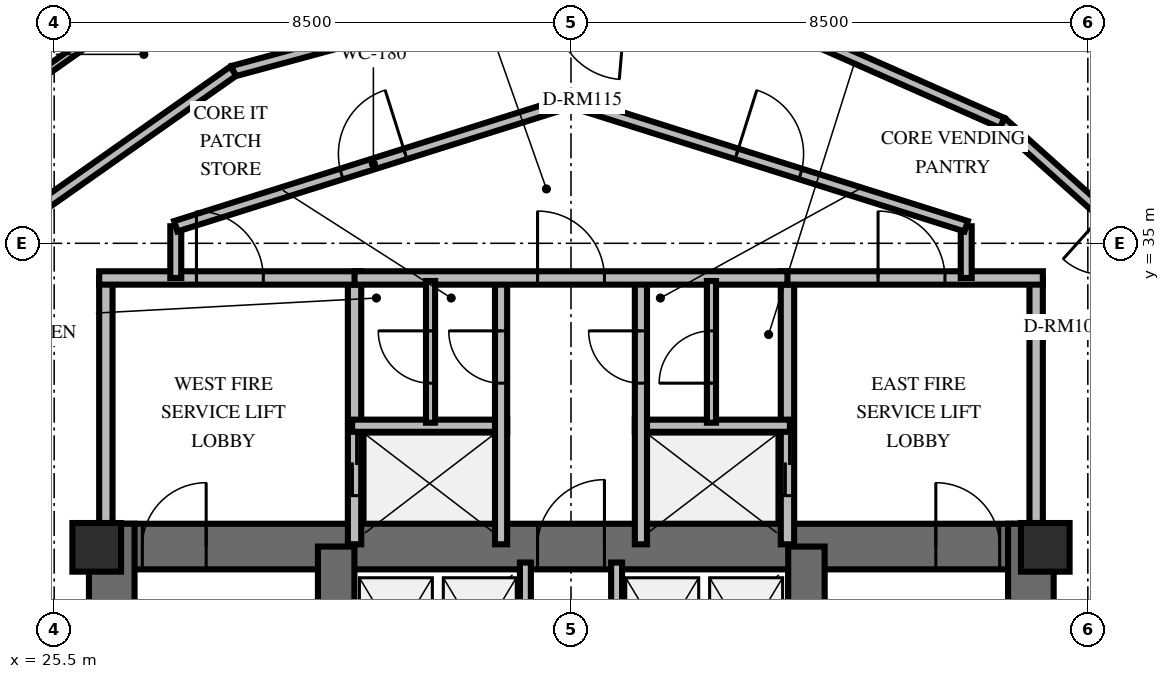
"""IFC4 building model, lengths in metres.
Left out: names, types, materials, properties, quantities, classifications, styles, units other than length and angle.
Written with IfcOpenShell. Run it as: python <this file> out.ifc"""

import sys

from ifc_helpers import new_model, si_unit, direction, frame, frame_2d, origin, origin_2d, place, context, subcontext, project, spatial, rectangle, extrude, element, fill, save


model = new_model("IFC4")
c1 = context("Model", 3, precision=1e-05, world=origin(), true_north=direction((0.0, 1.0)))
c2 = subcontext(c1, "Body", "Model", "MODEL_VIEW")
j1 = project(units=[si_unit("LENGTHUNIT", "METRE"), si_unit("PLANEANGLEUNIT", "RADIAN")], contexts=[c1])
p1 = place(None, origin())
s1 = spatial("IfcSite", under=j1, at=p1, CompositionType="ELEMENT")
p2 = place(p1, origin())
s2 = spatial("IfcBuilding", under=s1, at=p2, CompositionType="ELEMENT")
p3 = place(p2, frame((0.0, 0.0, 180.8)))
s3 = spatial("IfcBuildingStorey", under=s2, at=p3, CompositionType="ELEMENT", Elevation=180.8)
p4 = place(p3, frame((26.072, 30.013, 0.0), z_axis=(0.0, 0.0, 1.0), x_axis=(1.0, 0.0, 0.0)))
e1 = element("IfcWall", 1, at=p4, inside=s3, PredefinedType="SHEAR", context=c2, shape_type="SweptSolid", body=[
    extrude(rectangle(XDim=15.866, YDim=0.75, at=frame_2d((7.933, 0.0))), origin(), (0.0, 0.0, 1.0), 3.6),
])
p5 = place(p4, frame((0.878, 0.0, 0.0)))
e2 = element("IfcOpeningElement", 2, at=p5, cuts=e1, PredefinedType="OPENING", context=c2, shape_type="SweptSolid", body=[
    extrude(rectangle(XDim=1.05, YDim=2.15, at=frame_2d((0.525, 1.075))), frame((0.0, 0.385, 0.0), z_axis=(0.0, -1.0, 0.0), x_axis=(1.0, 0.0, 0.0)), (0.0, 0.0, 1.0), 0.77),
])
p6 = place(p4, frame((13.928, 0.0, 0.0)))
e3 = element("IfcOpeningElement", 3, at=p6, cuts=e1, PredefinedType="OPENING", context=c2, shape_type="SweptSolid", body=[
    extrude(rectangle(XDim=1.05, YDim=2.15, at=frame_2d((0.525, 1.075))), frame((0.0, 0.385, 0.0), z_axis=(0.0, -1.0, 0.0), x_axis=(1.0, 0.0, 0.0)), (0.0, 0.0, 1.0), 0.77),
])
p7 = place(p4, frame((7.378, 0.0, 0.0)))
e4 = element("IfcOpeningElement", 4, at=p7, cuts=e1, PredefinedType="OPENING", context=c2, shape_type="SweptSolid", body=[
    extrude(rectangle(XDim=1.1, YDim=2.15, at=frame_2d((0.55, 1.075))), frame((0.0, 0.385, 0.0), z_axis=(0.0, -1.0, 0.0), x_axis=(1.0, 0.0, 0.0)), (0.0, 0.0, 1.0), 0.77),
])
for number, where, z_axis, x_axis in (
    (5, (26.447, 19.812, 0.0), (0.0, 0.0, 1.0), (0.0, 1.0, 0.0)),
    (6, (41.563, 19.812, 0.0), (0.0, 0.0, 1.0), (0.0, 1.0, 0.0)),
):
    element("IfcWall", number, at=place(p3, frame(where, z_axis=z_axis, x_axis=x_axis)), inside=s3, PredefinedType="SHEAR", context=c2, shape_type="SweptSolid", body=[
        extrude(rectangle(XDim=10.576, YDim=0.75, at=frame_2d((5.288, 0.0))), origin(), (0.0, 0.0, 1.0), 3.6),
    ])
for number, where, z_axis, x_axis in (
    (7, (30.138, 20.187, 0.0), (0.0, 0.0, 1.0), (0.0, 1.0, 0.0)),
    (8, (37.872, 20.187, 0.0), (0.0, 0.0, 1.0), (0.0, 1.0, 0.0)),
):
    element("IfcWall", number, at=place(p3, frame(where, z_axis=z_axis, x_axis=x_axis)), inside=s3, PredefinedType="SHEAR", context=c2, shape_type="SweptSolid", body=[
        extrude(rectangle(XDim=9.826, YDim=0.6, at=frame_2d((4.913, 0.0))), origin(), (0.0, 0.0, 1.0), 3.6),
    ])
for number, where, z_axis, x_axis in (
    (9, (26.2, 30.0, 0.0), (0.0, 0.0, 1.0), (1.0, 0.0, 0.0)),
    (10, (41.8, 30.0, 0.0), (0.0, 0.0, 1.0), (1.0, 0.0, 0.0)),
):
    element("IfcColumn", number, at=place(p3, frame(where, z_axis=z_axis, x_axis=x_axis)), inside=s3, PredefinedType="PILASTER", context=c2, shape_type="SweptSolid", body=[
        extrude(rectangle(XDim=0.8, YDim=0.8, at=origin_2d()), origin(), (0.0, 0.0, 1.0), 3.6),
    ])
p8 = place(p3, frame((27.174, 42.753, 0.0), z_axis=(0.0, 0.0, 1.0), x_axis=(-0.817646670358, -0.575720350911, 0.0)))
e11 = element("IfcWall", 11, at=p8, inside=s3, PredefinedType="SOLIDWALL", context=c2, shape_type="SweptSolid", body=[
    extrude(rectangle(XDim=8.127, YDim=0.3, at=frame_2d((4.063, 0.0))), origin(), (0.0, 0.0, 1.0), 2.66),
])
p9 = place(p8, frame((0.35, 0.0, 0.0)))
e12 = element("IfcOpeningElement", 12, at=p9, cuts=e11, PredefinedType="OPENING", context=c2, shape_type="SweptSolid", body=[
    extrude(rectangle(XDim=1.05, YDim=2.15, at=frame_2d((0.525, 1.075))), frame((0.0, 0.16, 0.0), z_axis=(0.0, -1.0, 0.0), x_axis=(1.0, 0.0, 0.0)), (0.0, 0.0, 1.0), 0.32),
])
p10 = place(p3, frame((26.35, 30.05, 0.0), z_axis=(0.0, 0.0, 1.0), x_axis=(0.0, 1.0, 0.0)))
e13 = element("IfcWall", 13, at=p10, inside=s3, PredefinedType="SOLIDWALL", context=c2, shape_type="SweptSolid", body=[
    extrude(rectangle(XDim=4.38, YDim=0.22, at=frame_2d((2.19, 0.0))), origin(), (0.0, 0.0, 1.0), 2.46),
])
p11 = place(p3, frame((30.44, 30.05, 0.0), z_axis=(0.0, 0.0, 1.0), x_axis=(0.0, 1.0, 0.0)))
e14 = element("IfcWall", 14, at=p11, inside=s3, PredefinedType="SOLIDWALL", context=c2, shape_type="SweptSolid", body=[
    extrude(rectangle(XDim=4.38, YDim=0.22, at=frame_2d((2.19, 0.0))), origin(), (0.0, 0.0, 1.0), 2.46),
])
p12 = place(p11, frame((0.8, 0.0, 0.0)))
e15 = element("IfcOpeningElement", 15, at=p12, cuts=e14, PredefinedType="OPENING", context=c2, shape_type="SweptSolid", body=[
    extrude(rectangle(XDim=1.05, YDim=2.1, at=frame_2d((0.525, 1.05))), frame((0.0, 0.12, 0.0), z_axis=(0.0, -1.0, 0.0), x_axis=(1.0, 0.0, 0.0)), (0.0, 0.0, 1.0), 0.24),
])
p13 = place(p3, frame((26.24, 34.43, 0.0), z_axis=(0.0, 0.0, 1.0), x_axis=(1.0, 0.0, 0.0)))
e16 = element("IfcWall", 16, at=p13, inside=s3, PredefinedType="SOLIDWALL", context=c2, shape_type="SweptSolid", body=[
    extrude(rectangle(XDim=4.31, YDim=0.22, at=frame_2d((2.155, 0.0))), origin(), (0.0, 0.0, 1.0), 2.46),
])
p14 = place(p13, frame((1.6, 0.0, 0.0)))
e17 = element("IfcOpeningElement", 17, at=p14, cuts=e16, PredefinedType="OPENING", context=c2, shape_type="SweptSolid", body=[
    extrude(rectangle(XDim=1.1, YDim=2.15, at=frame_2d((0.55, 1.075))), frame((0.0, 0.12, 0.0), z_axis=(0.0, -1.0, 0.0), x_axis=(1.0, 0.0, 0.0)), (0.0, 0.0, 1.0), 0.24),
])
p15 = place(p3, frame((30.4, 32.0, 0.0), z_axis=(0.0, 0.0, 1.0), x_axis=(1.0, 0.0, 0.0)))
e18 = element("IfcWall", 18, at=p15, inside=s3, PredefinedType="SOLIDWALL", context=c2, shape_type="SweptSolid", body=[
    extrude(rectangle(XDim=2.55, YDim=0.2, at=frame_2d((1.275, 0.0))), origin(), (0.0, 0.0, 1.0), 2.46),
])
p16 = place(p3, frame((32.85, 30.05, 0.0), z_axis=(0.0, 0.0, 1.0), x_axis=(0.0, 1.0, 0.0)))
e19 = element("IfcWall", 19, at=p16, inside=s3, PredefinedType="SOLIDWALL", context=c2, shape_type="SweptSolid", body=[
    extrude(rectangle(XDim=4.38, YDim=0.2, at=frame_2d((2.19, 0.0))), origin(), (0.0, 0.0, 1.0), 2.46),
])
p17 = place(p16, frame((2.65, 0.0, 0.0)))
e20 = element("IfcOpeningElement", 20, at=p17, cuts=e19, PredefinedType="OPENING", context=c2, shape_type="SweptSolid", body=[
    extrude(rectangle(XDim=0.86, YDim=2.05, at=frame_2d((0.43, 1.025))), frame((0.0, 0.11, 0.0), z_axis=(0.0, -1.0, 0.0), x_axis=(1.0, 0.0, 0.0)), (0.0, 0.0, 1.0), 0.22),
])
p18 = place(p3, frame((37.56, 30.05, 0.0), z_axis=(0.0, 0.0, 1.0), x_axis=(0.0, 1.0, 0.0)))
e21 = element("IfcWall", 21, at=p18, inside=s3, PredefinedType="SOLIDWALL", context=c2, shape_type="SweptSolid", body=[
    extrude(rectangle(XDim=4.38, YDim=0.22, at=frame_2d((2.19, 0.0))), origin(), (0.0, 0.0, 1.0), 2.46),
])
p19 = place(p18, frame((0.8, 0.0, 0.0)))
e22 = element("IfcOpeningElement", 22, at=p19, cuts=e21, PredefinedType="OPENING", context=c2, shape_type="SweptSolid", body=[
    extrude(rectangle(XDim=1.05, YDim=2.1, at=frame_2d((0.525, 1.05))), frame((0.0, 0.12, 0.0), z_axis=(0.0, -1.0, 0.0), x_axis=(1.0, 0.0, 0.0)), (0.0, 0.0, 1.0), 0.24),
])
p20 = place(p3, frame((41.65, 30.05, 0.0), z_axis=(0.0, 0.0, 1.0), x_axis=(0.0, 1.0, 0.0)))
e23 = element("IfcWall", 23, at=p20, inside=s3, PredefinedType="SOLIDWALL", context=c2, shape_type="SweptSolid", body=[
    extrude(rectangle(XDim=4.38, YDim=0.22, at=frame_2d((2.19, 0.0))), origin(), (0.0, 0.0, 1.0), 2.46),
])
p21 = place(p3, frame((37.45, 34.43, 0.0), z_axis=(0.0, 0.0, 1.0), x_axis=(1.0, 0.0, 0.0)))
e24 = element("IfcWall", 24, at=p21, inside=s3, PredefinedType="SOLIDWALL", context=c2, shape_type="SweptSolid", body=[
    extrude(rectangle(XDim=4.31, YDim=0.22, at=frame_2d((2.155, 0.0))), origin(), (0.0, 0.0, 1.0), 2.46),
])
p22 = place(p21, frame((1.6, 0.0, 0.0)))
e25 = element("IfcOpeningElement", 25, at=p22, cuts=e24, PredefinedType="OPENING", context=c2, shape_type="SweptSolid", body=[
    extrude(rectangle(XDim=1.1, YDim=2.15, at=frame_2d((0.55, 1.075))), frame((0.0, 0.12, 0.0), z_axis=(0.0, -1.0, 0.0), x_axis=(1.0, 0.0, 0.0)), (0.0, 0.0, 1.0), 0.24),
])
p23 = place(p3, frame((35.05, 32.0, 0.0), z_axis=(0.0, 0.0, 1.0), x_axis=(1.0, 0.0, 0.0)))
e26 = element("IfcWall", 26, at=p23, inside=s3, PredefinedType="SOLIDWALL", context=c2, shape_type="SweptSolid", body=[
    extrude(rectangle(XDim=2.55, YDim=0.2, at=frame_2d((1.275, 0.0))), origin(), (0.0, 0.0, 1.0), 2.46),
])
p24 = place(p3, frame((35.15, 30.05, 0.0), z_axis=(0.0, 0.0, 1.0), x_axis=(0.0, 1.0, 0.0)))
e27 = element("IfcWall", 27, at=p24, inside=s3, PredefinedType="SOLIDWALL", context=c2, shape_type="SweptSolid", body=[
    extrude(rectangle(XDim=4.38, YDim=0.2, at=frame_2d((2.19, 0.0))), origin(), (0.0, 0.0, 1.0), 2.46),
])
p25 = place(p24, frame((2.65, 0.0, 0.0)))
e28 = element("IfcOpeningElement", 28, at=p25, cuts=e27, PredefinedType="OPENING", context=c2, shape_type="SweptSolid", body=[
    extrude(rectangle(XDim=0.86, YDim=2.05, at=frame_2d((0.43, 1.025))), frame((0.0, 0.11, 0.0), z_axis=(0.0, -1.0, 0.0), x_axis=(1.0, 0.0, 0.0)), (0.0, 0.0, 1.0), 0.22),
])
p26 = place(p3, frame((30.44, 34.43, 0.0), z_axis=(0.0, 0.0, 1.0), x_axis=(1.0, 0.0, 0.0)))
e29 = element("IfcWall", 29, at=p26, inside=s3, PredefinedType="SOLIDWALL", context=c2, shape_type="SweptSolid", body=[
    extrude(rectangle(XDim=7.12, YDim=0.22, at=frame_2d((3.56, 0.0))), origin(), (0.0, 0.0, 1.0), 2.46),
])
p27 = place(p26, frame((3.01, 0.0, 0.0)))
e30 = element("IfcOpeningElement", 30, at=p27, cuts=e29, PredefinedType="OPENING", context=c2, shape_type="SweptSolid", body=[
    extrude(rectangle(XDim=1.1, YDim=2.15, at=frame_2d((0.55, 1.075))), frame((0.0, 0.12, 0.0), z_axis=(0.0, -1.0, 0.0), x_axis=(1.0, 0.0, 0.0)), (0.0, 0.0, 1.0), 0.24),
])
p28 = place(p3, frame((31.69, 32.05, 0.0), z_axis=(0.0, 0.0, 1.0), x_axis=(0.0, 1.0, 0.0)))
e31 = element("IfcWall", 31, at=p28, inside=s3, PredefinedType="PARTITIONING", context=c2, shape_type="SweptSolid", body=[
    extrude(rectangle(XDim=2.33, YDim=0.15, at=frame_2d((1.165, 0.0))), origin(), (0.0, 0.0, 1.0), 2.46),
])
p29 = place(p28, frame((0.65, 0.0, 0.0)))
e32 = element("IfcOpeningElement", 32, at=p29, cuts=e31, PredefinedType="OPENING", context=c2, shape_type="SweptSolid", body=[
    extrude(rectangle(XDim=0.86, YDim=2.05, at=frame_2d((0.43, 1.025))), frame((0.0, 0.085, 0.0), z_axis=(0.0, -1.0, 0.0), x_axis=(1.0, 0.0, 0.0)), (0.0, 0.0, 1.0), 0.17),
])
p30 = place(p3, frame((36.31, 32.05, 0.0), z_axis=(0.0, 0.0, 1.0), x_axis=(0.0, 1.0, 0.0)))
e33 = element("IfcWall", 33, at=p30, inside=s3, PredefinedType="PARTITIONING", context=c2, shape_type="SweptSolid", body=[
    extrude(rectangle(XDim=2.33, YDim=0.15, at=frame_2d((1.165, 0.0))), origin(), (0.0, 0.0, 1.0), 2.46),
])
p31 = place(p30, frame((0.65, 0.0, 0.0)))
e34 = element("IfcOpeningElement", 34, at=p31, cuts=e33, PredefinedType="OPENING", context=c2, shape_type="SweptSolid", body=[
    extrude(rectangle(XDim=0.86, YDim=2.05, at=frame_2d((0.43, 1.025))), frame((0.0, 0.085, 0.0), z_axis=(0.0, -1.0, 0.0), x_axis=(1.0, 0.0, 0.0)), (0.0, 0.0, 1.0), 0.17),
])
for number, where, z_axis, x_axis in (
    (35, (33.25, 27.28, 0.0), (0.0, 0.0, 1.0), (0.0, 1.0, 0.0)),
    (36, (34.75, 27.28, 0.0), (0.0, 0.0, 1.0), (0.0, 1.0, 0.0)),
):
    element("IfcWall", number, at=place(p3, frame(where, z_axis=z_axis, x_axis=x_axis)), inside=s3, PredefinedType="SOLIDWALL", context=c2, shape_type="SweptSolid", body=[
        extrude(rectangle(XDim=2.47, YDim=0.18, at=frame_2d((1.235, 0.0))), origin(), (0.0, 0.0, 1.0), 2.46),
    ])
for number, where, z_axis, x_axis in (
    (37, (27.5, 34.43, 0.0), (0.0, 0.0, 1.0), (0.0, 1.0, 0.0)),
    (38, (40.5, 35.28, 0.0), (0.0, 0.0, 1.0), (0.0, -1.0, 0.0)),
):
    element("IfcWall", number, at=place(p3, frame(where, z_axis=z_axis, x_axis=x_axis)), inside=s3, PredefinedType="PARTITIONING", context=c2, shape_type="SweptSolid", body=[
        extrude(rectangle(XDim=0.85, YDim=0.18, at=frame_2d((0.425, 0.0))), origin(), (0.0, 0.0, 1.0), 2.46),
    ])
p32 = place(p3, frame((27.5, 35.28, 0.0), z_axis=(0.0, 0.0, 1.0), x_axis=(0.953691418528, 0.300786765376, 0.0)))
e39 = element("IfcWall", 39, at=p32, inside=s3, PredefinedType="PARTITIONING", context=c2, shape_type="SweptSolid", body=[
    extrude(rectangle(XDim=6.816, YDim=0.18, at=frame_2d((3.408, 0.0))), origin(), (0.0, 0.0, 1.0), 2.46),
])
p33 = place(p32, frame((2.858, 0.0, 0.0)))
e40 = element("IfcOpeningElement", 40, at=p33, cuts=e39, PredefinedType="OPENING", context=c2, shape_type="SweptSolid", body=[
    extrude(rectangle(XDim=1.1, YDim=2.15, at=frame_2d((0.55, 1.075))), frame((0.0, 0.1, 0.0), z_axis=(0.0, -1.0, 0.0), x_axis=(1.0, 0.0, 0.0)), (0.0, 0.0, 1.0), 0.2),
])
p34 = place(p3, frame((34.0, 37.33, 0.0), z_axis=(0.0, 0.0, 1.0), x_axis=(0.953691418528, -0.300786765376, 0.0)))
e41 = element("IfcWall", 41, at=p34, inside=s3, PredefinedType="PARTITIONING", context=c2, shape_type="SweptSolid", body=[
    extrude(rectangle(XDim=6.816, YDim=0.18, at=frame_2d((3.408, 0.0))), origin(), (0.0, 0.0, 1.0), 2.46),
])
p35 = place(p34, frame((2.858, 0.0, 0.0)))
e42 = element("IfcOpeningElement", 42, at=p35, cuts=e41, PredefinedType="OPENING", context=c2, shape_type="SweptSolid", body=[
    extrude(rectangle(XDim=1.1, YDim=2.15, at=frame_2d((0.55, 1.075))), frame((0.0, 0.1, 0.0), z_axis=(0.0, -1.0, 0.0), x_axis=(1.0, 0.0, 0.0)), (0.0, 0.0, 1.0), 0.2),
])
p36 = place(p3, frame((44.136, 34.252, 0.0), z_axis=(0.0, 0.0, 1.0), x_axis=(-0.74490394687, 0.667171724474, 0.0)))
e43 = element("IfcWall", 43, at=p36, inside=s3, PredefinedType="PARTITIONING", context=c2, shape_type="SweptSolid", body=[
    extrude(rectangle(XDim=4.089, YDim=0.18, at=frame_2d((2.045, 0.0))), origin(), (0.0, 0.0, 1.0), 2.46),
])
p37 = place(p36, frame((0.847, 0.0, 0.0)))
e44 = element("IfcOpeningElement", 44, at=p37, cuts=e43, PredefinedType="OPENING", context=c2, shape_type="SweptSolid", body=[
    extrude(rectangle(XDim=1.0, YDim=2.15, at=frame_2d((0.5, 1.075))), frame((0.0, 0.1, 0.0), z_axis=(0.0, -1.0, 0.0), x_axis=(1.0, 0.0, 0.0)), (0.0, 0.0, 1.0), 0.2),
])
p38 = place(p3, frame((41.09, 36.98, 0.0), z_axis=(0.0, 0.0, 1.0), x_axis=(-0.914595215727, 0.404370611406, 0.0)))
e45 = element("IfcWall", 45, at=p38, inside=s3, PredefinedType="PARTITIONING", context=c2, shape_type="SweptSolid", body=[
    extrude(rectangle(XDim=4.089, YDim=0.18, at=frame_2d((2.044, 0.0))), origin(), (0.0, 0.0, 1.0), 2.46),
])
p39 = place(p3, frame((32.827, 39.017, 0.0), z_axis=(0.0, 0.0, 1.0), x_axis=(-0.965248703795, -0.261333005613, 0.0)))
e46 = element("IfcWall", 46, at=p39, inside=s3, PredefinedType="PARTITIONING", context=c2, shape_type="SweptSolid", body=[
    extrude(rectangle(XDim=4.539, YDim=0.18, at=frame_2d((2.27, 0.0))), origin(), (0.0, 0.0, 1.0), 2.46),
])
p40 = place(p3, frame((28.445, 37.831, 0.0), z_axis=(0.0, 0.0, 1.0), x_axis=(-0.817672323989, -0.575683915515, 0.0)))
e47 = element("IfcWall", 47, at=p40, inside=s3, PredefinedType="PARTITIONING", context=c2, shape_type="SweptSolid", body=[
    extrude(rectangle(XDim=4.539, YDim=0.18, at=frame_2d((2.27, 0.0))), origin(), (0.0, 0.0, 1.0), 2.46),
])
p41 = place(p3, frame((27.68, 39.46, 0.0), z_axis=(0.0, 0.0, 1.0), x_axis=(-0.817656414875, -0.575706511352, 0.0)))
e48 = element("IfcWall", 48, at=p41, inside=s3, PredefinedType="PARTITIONING", context=c2, shape_type="SweptSolid", body=[
    extrude(rectangle(XDim=5.164, YDim=0.125, at=frame_2d((2.582, 0.0))), origin(), (0.0, 0.0, 1.0), 2.46),
])
p42 = place(p5, origin())
e49 = element("IfcDoor", 49, at=p42, inside=s3, OperationType="SINGLE_SWING_RIGHT", PredefinedType="DOOR", context=c2, shape_type="SweptSolid", body=[
    extrude(rectangle(XDim=1.05, YDim=2.15, at=frame_2d((0.525, 1.075))), frame((0.0, 0.025, 0.0), z_axis=(0.0, -1.0, 0.0), x_axis=(1.0, 0.0, 0.0)), (0.0, 0.0, 1.0), 0.05),
])
fill(e2, e49)
p43 = place(p6, origin())
e50 = element("IfcDoor", 50, at=p43, inside=s3, OperationType="SINGLE_SWING_LEFT", PredefinedType="DOOR", context=c2, shape_type="SweptSolid", body=[
    extrude(rectangle(XDim=1.05, YDim=2.15, at=frame_2d((0.525, 1.075))), frame((0.0, 0.025, 0.0), z_axis=(0.0, -1.0, 0.0), x_axis=(1.0, 0.0, 0.0)), (0.0, 0.0, 1.0), 0.05),
])
fill(e3, e50)
p44 = place(p7, origin())
e51 = element("IfcDoor", 51, at=p44, inside=s3, OperationType="SINGLE_SWING_RIGHT", PredefinedType="DOOR", context=c2, shape_type="SweptSolid", body=[
    extrude(rectangle(XDim=1.1, YDim=2.15, at=frame_2d((0.55, 1.075))), frame((0.0, 0.025, 0.0), z_axis=(0.0, -1.0, 0.0), x_axis=(1.0, 0.0, 0.0)), (0.0, 0.0, 1.0), 0.05),
])
fill(e4, e51)
p45 = place(p14, origin())
e52 = element("IfcDoor", 52, at=p45, inside=s3, OperationType="SINGLE_SWING_LEFT", PredefinedType="DOOR", context=c2, shape_type="SweptSolid", body=[
    extrude(rectangle(XDim=1.1, YDim=2.15, at=frame_2d((0.55, 1.075))), frame((0.0, 0.025, 0.0), z_axis=(0.0, -1.0, 0.0), x_axis=(1.0, 0.0, 0.0)), (0.0, 0.0, 1.0), 0.05),
])
fill(e17, e52)
p46 = place(p12, origin())
e53 = element("IfcDoor", 53, at=p46, inside=s3, OperationType="DOUBLE_DOOR_SLIDING", PredefinedType="USERDEFINED", context=c2, shape_type="SweptSolid", body=[
    extrude(rectangle(XDim=1.05, YDim=2.1, at=frame_2d((0.525, 1.05))), frame((0.0, 0.025, 0.0), z_axis=(0.0, -1.0, 0.0), x_axis=(1.0, 0.0, 0.0)), (0.0, 0.0, 1.0), 0.05),
])
fill(e15, e53)
p47 = place(p17, origin())
e54 = element("IfcDoor", 54, at=p47, inside=s3, OperationType="SINGLE_SWING_RIGHT", PredefinedType="TRAPDOOR", context=c2, shape_type="SweptSolid", body=[
    extrude(rectangle(XDim=0.86, YDim=2.05, at=frame_2d((0.43, 1.025))), frame((0.0, 0.025, 0.0), z_axis=(0.0, -1.0, 0.0), x_axis=(1.0, 0.0, 0.0)), (0.0, 0.0, 1.0), 0.05),
])
fill(e20, e54)
p48 = place(p22, origin())
e55 = element("IfcDoor", 55, at=p48, inside=s3, OperationType="SINGLE_SWING_LEFT", PredefinedType="DOOR", context=c2, shape_type="SweptSolid", body=[
    extrude(rectangle(XDim=1.1, YDim=2.15, at=frame_2d((0.55, 1.075))), frame((0.0, 0.025, 0.0), z_axis=(0.0, -1.0, 0.0), x_axis=(1.0, 0.0, 0.0)), (0.0, 0.0, 1.0), 0.05),
])
fill(e25, e55)
p49 = place(p19, origin())
e56 = element("IfcDoor", 56, at=p49, inside=s3, OperationType="DOUBLE_DOOR_SLIDING", PredefinedType="USERDEFINED", context=c2, shape_type="SweptSolid", body=[
    extrude(rectangle(XDim=1.05, YDim=2.1, at=frame_2d((0.525, 1.05))), frame((0.0, 0.025, 0.0), z_axis=(0.0, -1.0, 0.0), x_axis=(1.0, 0.0, 0.0)), (0.0, 0.0, 1.0), 0.05),
])
fill(e22, e56)
p50 = place(p25, origin())
e57 = element("IfcDoor", 57, at=p50, inside=s3, OperationType="SINGLE_SWING_RIGHT", PredefinedType="TRAPDOOR", context=c2, shape_type="SweptSolid", body=[
    extrude(rectangle(XDim=0.86, YDim=2.05, at=frame_2d((0.43, 1.025))), frame((0.0, 0.025, 0.0), z_axis=(0.0, -1.0, 0.0), x_axis=(1.0, 0.0, 0.0)), (0.0, 0.0, 1.0), 0.05),
])
fill(e28, e57)
p51 = place(p27, origin())
e58 = element("IfcDoor", 58, at=p51, inside=s3, OperationType="SINGLE_SWING_LEFT", PredefinedType="DOOR", context=c2, shape_type="SweptSolid", body=[
    extrude(rectangle(XDim=1.1, YDim=2.15, at=frame_2d((0.55, 1.075))), frame((0.0, 0.025, 0.0), z_axis=(0.0, -1.0, 0.0), x_axis=(1.0, 0.0, 0.0)), (0.0, 0.0, 1.0), 0.05),
])
fill(e30, e58)
p52 = place(p29, origin())
e59 = element("IfcDoor", 59, at=p52, inside=s3, OperationType="SINGLE_SWING_RIGHT", PredefinedType="TRAPDOOR", context=c2, shape_type="SweptSolid", body=[
    extrude(rectangle(XDim=0.86, YDim=2.05, at=frame_2d((0.43, 1.025))), frame((0.0, 0.025, 0.0), z_axis=(0.0, -1.0, 0.0), x_axis=(1.0, 0.0, 0.0)), (0.0, 0.0, 1.0), 0.05),
])
fill(e32, e59)
p53 = place(p31, origin())
e60 = element("IfcDoor", 60, at=p53, inside=s3, OperationType="SINGLE_SWING_LEFT", PredefinedType="TRAPDOOR", context=c2, shape_type="SweptSolid", body=[
    extrude(rectangle(XDim=0.86, YDim=2.05, at=frame_2d((0.43, 1.025))), frame((0.0, 0.025, 0.0), z_axis=(0.0, -1.0, 0.0), x_axis=(1.0, 0.0, 0.0)), (0.0, 0.0, 1.0), 0.05),
])
fill(e34, e60)
p54 = place(p33, origin())
e61 = element("IfcDoor", 61, at=p54, inside=s3, OperationType="SINGLE_SWING_RIGHT", PredefinedType="DOOR", context=c2, shape_type="SweptSolid", body=[
    extrude(rectangle(XDim=1.1, YDim=2.15, at=frame_2d((0.55, 1.075))), frame((0.0, 0.025, 0.0), z_axis=(0.0, -1.0, 0.0), x_axis=(1.0, 0.0, 0.0)), (0.0, 0.0, 1.0), 0.05),
])
fill(e40, e61)
p55 = place(p35, origin())
e62 = element("IfcDoor", 62, at=p55, inside=s3, OperationType="SINGLE_SWING_LEFT", PredefinedType="DOOR", context=c2, shape_type="SweptSolid", body=[
    extrude(rectangle(XDim=1.1, YDim=2.15, at=frame_2d((0.55, 1.075))), frame((0.0, 0.025, 0.0), z_axis=(0.0, -1.0, 0.0), x_axis=(1.0, 0.0, 0.0)), (0.0, 0.0, 1.0), 0.05),
])
fill(e42, e62)
save(model, sys.argv[1])
